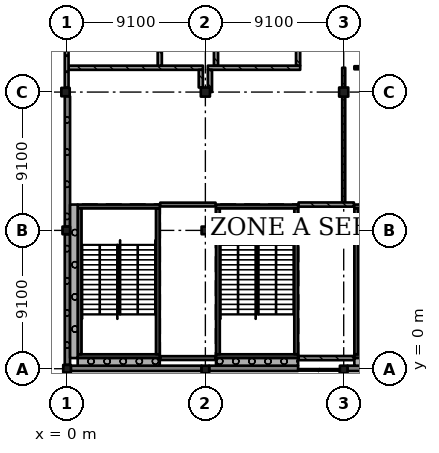
"""IFC4 building model, lengths in metres.
Left out: names, types, materials, properties, quantities, classifications, styles, units other than length and angle.
Written with IfcOpenShell. Run it as: python <this file> out.ifc"""

import sys

from ifc_helpers import new_model, si_unit, direction, frame, frame_2d, origin, origin_2d, place, context, subcontext, project, spatial, rectangle, extrude, element, fill, save


model = new_model("IFC4")
c1 = context("Model", 3, precision=1e-05, world=origin(), true_north=direction((0.0, 1.0)))
c2 = subcontext(c1, "Body", "Model", "MODEL_VIEW")
j1 = project(units=[si_unit("LENGTHUNIT", "METRE"), si_unit("PLANEANGLEUNIT", "RADIAN")], contexts=[c1])
p1 = place(None, origin())
s1 = spatial("IfcSite", under=j1, at=p1, CompositionType="ELEMENT")
p2 = place(p1, origin())
s2 = spatial("IfcBuilding", under=s1, at=p2, CompositionType="ELEMENT")
p3 = place(p2, frame((0.0, 0.0, 20.02)))
s3 = spatial("IfcBuildingStorey", under=s2, at=p3, CompositionType="ELEMENT", Elevation=20.02)
for number, where, z_axis, x_axis in (
    (1, (0.0, 0.0, 0.0), (0.0, 0.0, 1.0), (1.0, 0.0, 0.0)),
    (2, (-0.05, 9.1, 0.0), (0.0, 0.0, 1.0), (1.0, 0.0, 0.0)),
):
    element("IfcColumn", number, at=place(p3, frame(where, z_axis=z_axis, x_axis=x_axis)), inside=s3, PredefinedType="COLUMN", context=c2, shape_type="SweptSolid", body=[
        extrude(rectangle(XDim=0.5, YDim=0.5, at=origin_2d()), origin(), (0.0, 0.0, 1.0), 4.55),
    ])
p4 = place(p3, frame((-0.1, 18.2, 0.0), z_axis=(0.0, 0.0, 1.0), x_axis=(1.0, 0.0, 0.0)))
e3 = element("IfcColumn", 3, at=p4, inside=s3, PredefinedType="COLUMN", context=c2, shape_type="SweptSolid", body=[
    extrude(rectangle(XDim=0.55, YDim=0.55, at=origin_2d()), origin(), (0.0, 0.0, 1.0), 4.55),
])
for number, where, z_axis, x_axis in (
    (4, (9.1, -0.05, 0.0), (0.0, 0.0, 1.0), (1.0, 0.0, 0.0)),
    (5, (9.1, 9.1, 0.0), (0.0, 0.0, 1.0), (1.0, 0.0, 0.0)),
):
    element("IfcColumn", number, at=place(p3, frame(where, z_axis=z_axis, x_axis=x_axis)), inside=s3, PredefinedType="COLUMN", context=c2, shape_type="SweptSolid", body=[
        extrude(rectangle(XDim=0.5, YDim=0.5, at=origin_2d()), origin(), (0.0, 0.0, 1.0), 4.55),
    ])
p5 = place(p3, frame((9.1, 18.2, 0.0), z_axis=(0.0, 0.0, 1.0), x_axis=(1.0, 0.0, 0.0)))
e6 = element("IfcColumn", 6, at=p5, inside=s3, PredefinedType="COLUMN", context=c2, shape_type="SweptSolid", body=[
    extrude(rectangle(XDim=0.6, YDim=0.6, at=origin_2d()), origin(), (0.0, 0.0, 1.0), 4.55),
])
for number, where, z_axis, x_axis in (
    (7, (18.2, -0.05, 0.0), (0.0, 0.0, 1.0), (1.0, 0.0, 0.0)),
    (8, (18.2, 9.1, 0.0), (0.0, 0.0, 1.0), (1.0, 0.0, 0.0)),
):
    element("IfcColumn", number, at=place(p3, frame(where, z_axis=z_axis, x_axis=x_axis)), inside=s3, PredefinedType="COLUMN", context=c2, shape_type="SweptSolid", body=[
        extrude(rectangle(XDim=0.5, YDim=0.5, at=origin_2d()), origin(), (0.0, 0.0, 1.0), 4.55),
    ])
p6 = place(p3, frame((18.2, 18.2, 0.0), z_axis=(0.0, 0.0, 1.0), x_axis=(1.0, 0.0, 0.0)))
e9 = element("IfcColumn", 9, at=p6, inside=s3, PredefinedType="COLUMN", context=c2, shape_type="SweptSolid", body=[
    extrude(rectangle(XDim=0.6, YDim=0.6, at=origin_2d()), origin(), (0.0, 0.0, 1.0), 4.55),
])
p7 = place(p3, frame((6.1, 0.825, 0.0), z_axis=(0.0, 0.0, 1.0), x_axis=(-1.0, 0.0, 0.0)))
e10 = element("IfcWall", 10, at=p7, inside=s3, PredefinedType="SHEAR", context=c2, shape_type="SweptSolid", body=[
    extrude(rectangle(XDim=5.4, YDim=0.25, at=frame_2d((2.7, 0.0))), origin(), (0.0, 0.0, 1.0), 4.55),
])
p8 = place(p3, frame((6.1, 10.675, 0.0), z_axis=(0.0, 0.0, 1.0), x_axis=(-1.0, 0.0, 0.0)))
e11 = element("IfcWall", 11, at=p8, inside=s3, PredefinedType="SHEAR", context=c2, shape_type="SweptSolid", body=[
    extrude(rectangle(XDim=5.4, YDim=0.25, at=frame_2d((2.7, 0.0))), origin(), (0.0, 0.0, 1.0), 4.55),
])
p9 = place(p8, frame((1.5, 0.0, 0.0)))
e12 = element("IfcOpeningElement", 12, at=p9, cuts=e11, PredefinedType="OPENING", context=c2, shape_type="SweptSolid", body=[
    extrude(rectangle(XDim=2.4, YDim=2.1, at=frame_2d((1.2, 1.05))), frame((0.0, 0.135, 0.0), z_axis=(0.0, -1.0, 0.0), x_axis=(1.0, 0.0, 0.0)), (0.0, 0.0, 1.0), 0.27),
])
for number, where, z_axis, x_axis in (
    (13, (0.825, 10.55, 0.0), (0.0, 0.0, 1.0), (0.0, -1.0, 0.0)),
    (14, (5.975, 10.55, 0.0), (0.0, 0.0, 1.0), (0.0, -1.0, 0.0)),
):
    element("IfcWall", number, at=place(p3, frame(where, z_axis=z_axis, x_axis=x_axis)), inside=s3, PredefinedType="SHEAR", context=c2, shape_type="SweptSolid", body=[
        extrude(rectangle(XDim=9.6, YDim=0.25, at=frame_2d((4.8, 0.0))), origin(), (0.0, 0.0, 1.0), 4.55),
    ])
p10 = place(p3, frame((15.2, 0.825, 0.0), z_axis=(0.0, 0.0, 1.0), x_axis=(-1.0, 0.0, 0.0)))
e15 = element("IfcWall", 15, at=p10, inside=s3, PredefinedType="SHEAR", context=c2, shape_type="SweptSolid", body=[
    extrude(rectangle(XDim=5.4, YDim=0.25, at=frame_2d((2.7, 0.0))), origin(), (0.0, 0.0, 1.0), 4.55),
])
p11 = place(p3, frame((15.2, 10.675, 0.0), z_axis=(0.0, 0.0, 1.0), x_axis=(-1.0, 0.0, 0.0)))
e16 = element("IfcWall", 16, at=p11, inside=s3, PredefinedType="SHEAR", context=c2, shape_type="SweptSolid", body=[
    extrude(rectangle(XDim=5.4, YDim=0.25, at=frame_2d((2.7, 0.0))), origin(), (0.0, 0.0, 1.0), 4.55),
])
p12 = place(p11, frame((1.5, 0.0, 0.0)))
e17 = element("IfcOpeningElement", 17, at=p12, cuts=e16, PredefinedType="OPENING", context=c2, shape_type="SweptSolid", body=[
    extrude(rectangle(XDim=2.4, YDim=2.1, at=frame_2d((1.2, 1.05))), frame((0.0, 0.135, 0.0), z_axis=(0.0, -1.0, 0.0), x_axis=(1.0, 0.0, 0.0)), (0.0, 0.0, 1.0), 0.27),
])
for number, where, z_axis, x_axis in (
    (18, (9.925, 10.55, 0.0), (0.0, 0.0, 1.0), (0.0, -1.0, 0.0)),
    (19, (15.075, 10.55, 0.0), (0.0, 0.0, 1.0), (0.0, -1.0, 0.0)),
):
    element("IfcWall", number, at=place(p3, frame(where, z_axis=z_axis, x_axis=x_axis)), inside=s3, PredefinedType="SHEAR", context=c2, shape_type="SweptSolid", body=[
        extrude(rectangle(XDim=9.6, YDim=0.25, at=frame_2d((4.8, 0.0))), origin(), (0.0, 0.0, 1.0), 4.55),
    ])
p13 = place(p3, frame((24.3, 0.825, 0.0), z_axis=(0.0, 0.0, 1.0), x_axis=(-1.0, 0.0, 0.0)))
e20 = element("IfcWall", 20, at=p13, inside=s3, PredefinedType="SHEAR", context=c2, shape_type="SweptSolid", body=[
    extrude(rectangle(XDim=5.4, YDim=0.25, at=frame_2d((2.7, 0.0))), origin(), (0.0, 0.0, 1.0), 4.55),
])
p14 = place(p3, frame((24.3, 10.675, 0.0), z_axis=(0.0, 0.0, 1.0), x_axis=(-1.0, 0.0, 0.0)))
e21 = element("IfcWall", 21, at=p14, inside=s3, PredefinedType="SHEAR", context=c2, shape_type="SweptSolid", body=[
    extrude(rectangle(XDim=5.4, YDim=0.25, at=frame_2d((2.7, 0.0))), origin(), (0.0, 0.0, 1.0), 4.55),
])
p15 = place(p14, frame((1.5, 0.0, 0.0)))
e22 = element("IfcOpeningElement", 22, at=p15, cuts=e21, PredefinedType="OPENING", context=c2, shape_type="SweptSolid", body=[
    extrude(rectangle(XDim=2.4, YDim=2.1, at=frame_2d((1.2, 1.05))), frame((0.0, 0.135, 0.0), z_axis=(0.0, -1.0, 0.0), x_axis=(1.0, 0.0, 0.0)), (0.0, 0.0, 1.0), 0.27),
])
p16 = place(p3, frame((19.025, 10.55, 0.0), z_axis=(0.0, 0.0, 1.0), x_axis=(0.0, -1.0, 0.0)))
e23 = element("IfcWall", 23, at=p16, inside=s3, PredefinedType="SHEAR", context=c2, shape_type="SweptSolid", body=[
    extrude(rectangle(XDim=9.6, YDim=0.25, at=frame_2d((4.8, 0.0))), origin(), (0.0, 0.0, 1.0), 4.55),
])
p17 = place(p3, frame((0.25, 0.025, 0.0), z_axis=(0.0, 0.0, 1.0), x_axis=(1.0, 0.0, 0.0)))
e24 = element("IfcWall", 24, at=p17, inside=s3, PredefinedType="SOLIDWALL", context=c2, shape_type="SweptSolid", body=[
    extrude(rectangle(XDim=8.6, YDim=0.35, at=frame_2d((4.3, 0.0))), origin(), (0.0, 0.0, 1.0), 3.5),
])
p18 = place(p3, frame((9.35, 0.025, 0.0), z_axis=(0.0, 0.0, 1.0), x_axis=(1.0, 0.0, 0.0)))
e25 = element("IfcWall", 25, at=p18, inside=s3, PredefinedType="SOLIDWALL", context=c2, shape_type="SweptSolid", body=[
    extrude(rectangle(XDim=5.85, YDim=0.35, at=frame_2d((2.925, 0.0))), origin(), (0.0, 0.0, 1.0), 3.5),
])
p19 = place(p3, frame((18.45, 0.025, 0.0), z_axis=(0.0, 0.0, 1.0), x_axis=(1.0, 0.0, 0.0)))
e26 = element("IfcWall", 26, at=p19, inside=s3, PredefinedType="SOLIDWALL", context=c2, shape_type="SweptSolid", body=[
    extrude(rectangle(XDim=8.6, YDim=0.35, at=frame_2d((4.3, 0.0))), origin(), (0.0, 0.0, 1.0), 3.5),
])
p20 = place(p3, frame((-0.025, 27.025, 0.0), z_axis=(0.0, 0.0, 1.0), x_axis=(0.0, -1.0, 0.0)))
e27 = element("IfcWall", 27, at=p20, inside=s3, PredefinedType="SOLIDWALL", context=c2, shape_type="SweptSolid", body=[
    extrude(rectangle(XDim=8.55, YDim=0.25, at=frame_2d((4.275, 0.0))), origin(), (0.0, 0.0, 1.0), 3.5),
])
p21 = place(p3, frame((0.025, 17.925, 0.0), z_axis=(0.0, 0.0, 1.0), x_axis=(0.0, -1.0, 0.0)))
e28 = element("IfcWall", 28, at=p21, inside=s3, PredefinedType="SOLIDWALL", context=c2, shape_type="SweptSolid", body=[
    extrude(rectangle(XDim=8.575, YDim=0.35, at=frame_2d((4.288, 0.0))), origin(), (0.0, 0.0, 1.0), 3.5),
])
p22 = place(p3, frame((0.025, 8.85, 0.0), z_axis=(0.0, 0.0, 1.0), x_axis=(0.0, -1.0, 0.0)))
e29 = element("IfcWall", 29, at=p22, inside=s3, PredefinedType="SOLIDWALL", context=c2, shape_type="SweptSolid", body=[
    extrude(rectangle(XDim=8.6, YDim=0.35, at=frame_2d((4.3, 0.0))), origin(), (0.0, 0.0, 1.0), 3.5),
])
p23 = place(p3, frame((0.7, 0.45, 0.0), z_axis=(0.0, 0.0, 1.0), x_axis=(1.0, 0.0, 0.0)))
e30 = element("IfcWall", 30, at=p23, inside=s3, PredefinedType="SOLIDWALL", context=c2, shape_type="SweptSolid", body=[
    extrude(rectangle(XDim=5.4, YDim=0.5, at=frame_2d((2.7, 0.0))), origin(), (0.0, 0.0, 1.0), 4.25),
])
p24 = place(p3, frame((0.45, 0.7, 0.0), z_axis=(0.0, 0.0, 1.0), x_axis=(0.0, 1.0, 0.0)))
e31 = element("IfcWall", 31, at=p24, inside=s3, PredefinedType="SOLIDWALL", context=c2, shape_type="SweptSolid", body=[
    extrude(rectangle(XDim=10.1, YDim=0.5, at=frame_2d((5.05, 0.0))), origin(), (0.0, 0.0, 1.0), 4.25),
])
p25 = place(p3, frame((9.8, 0.45, 0.0), z_axis=(0.0, 0.0, 1.0), x_axis=(1.0, 0.0, 0.0)))
e32 = element("IfcWall", 32, at=p25, inside=s3, PredefinedType="SOLIDWALL", context=c2, shape_type="SweptSolid", body=[
    extrude(rectangle(XDim=5.4, YDim=0.5, at=frame_2d((2.7, 0.0))), origin(), (0.0, 0.0, 1.0), 4.25),
])
p26 = place(p3, frame((18.9, 0.45, 0.0), z_axis=(0.0, 0.0, 1.0), x_axis=(1.0, 0.0, 0.0)))
e33 = element("IfcWall", 33, at=p26, inside=s3, PredefinedType="SOLIDWALL", context=c2, shape_type="SweptSolid", body=[
    extrude(rectangle(XDim=5.4, YDim=0.5, at=frame_2d((2.7, 0.0))), origin(), (0.0, 0.0, 1.0), 4.25),
])
p27 = place(p3, frame((0.1, 19.8, 0.0), z_axis=(0.0, 0.0, 1.0), x_axis=(1.0, 0.0, 0.0)))
e34 = element("IfcWall", 34, at=p27, inside=s3, PredefinedType="SOLIDWALL", context=c2, shape_type="SweptSolid", body=[
    extrude(rectangle(XDim=8.837, YDim=0.275, at=frame_2d((4.419, 0.0))), origin(), (0.0, 0.0, 1.0), 4.25),
])
p28 = place(p27, frame((6.85, 0.0, 0.0)))
e35 = element("IfcOpeningElement", 35, at=p28, cuts=e34, PredefinedType="OPENING", context=c2, shape_type="SweptSolid", body=[
    extrude(rectangle(XDim=1.2, YDim=2.4, at=frame_2d((0.6, 1.2))), frame((0.0, 0.147, 0.0), z_axis=(0.0, -1.0, 0.0), x_axis=(1.0, 0.0, 0.0)), (0.0, 0.0, 1.0), 0.295),
])
p29 = place(p27, frame((2.65, 0.0, 0.0)))
e36 = element("IfcOpeningElement", 36, at=p29, cuts=e34, PredefinedType="OPENING", context=c2, shape_type="SweptSolid", body=[
    extrude(rectangle(XDim=1.2, YDim=2.4, at=frame_2d((0.6, 1.2))), frame((0.0, 0.147, 0.0), z_axis=(0.0, -1.0, 0.0), x_axis=(1.0, 0.0, 0.0)), (0.0, 0.0, 1.0), 0.295),
])
p30 = place(p3, frame((6.1, 29.762, 0.0), z_axis=(0.0, 0.0, 1.0), x_axis=(0.0, -1.0, 0.0)))
e37 = element("IfcWall", 37, at=p30, inside=s3, PredefinedType="SOLIDWALL", context=c2, shape_type="SweptSolid", body=[
    extrude(rectangle(XDim=9.825, YDim=0.275, at=frame_2d((4.913, 0.0))), origin(), (0.0, 0.0, 1.0), 4.25),
])
p31 = place(p3, frame((8.8, 19.663, 0.0), z_axis=(0.0, 0.0, 1.0), x_axis=(0.0, -1.0, 0.0)))
e38 = element("IfcWall", 38, at=p31, inside=s3, PredefinedType="SOLIDWALL", context=c2, shape_type="SweptSolid", body=[
    extrude(rectangle(XDim=1.163, YDim=0.275, at=frame_2d((0.581, 0.0))), origin(), (0.0, 0.0, 1.0), 4.25),
])
p32 = place(p3, frame((9.262, 19.8, 0.0), z_axis=(0.0, 0.0, 1.0), x_axis=(1.0, 0.0, 0.0)))
e39 = element("IfcWall", 39, at=p32, inside=s3, PredefinedType="SOLIDWALL", context=c2, shape_type="SweptSolid", body=[
    extrude(rectangle(XDim=6.075, YDim=0.275, at=frame_2d((3.038, 0.0))), origin(), (0.0, 0.0, 1.0), 4.25),
])
p33 = place(p32, frame((2.688, 0.0, 0.0)))
e40 = element("IfcOpeningElement", 40, at=p33, cuts=e39, PredefinedType="OPENING", context=c2, shape_type="SweptSolid", body=[
    extrude(rectangle(XDim=1.2, YDim=2.4, at=frame_2d((0.6, 1.2))), frame((0.0, 0.147, 0.0), z_axis=(0.0, -1.0, 0.0), x_axis=(1.0, 0.0, 0.0)), (0.0, 0.0, 1.0), 0.295),
])
p34 = place(p3, frame((9.35, 8.85, 0.0), z_axis=(0.0, 0.0, 1.0), x_axis=(1.0, 0.0, 0.0)))
e41 = element("IfcWall", 41, at=p34, inside=s3, PredefinedType="SOLIDWALL", context=c2, shape_type="SweptSolid", body=[
    extrude(rectangle(XDim=0.42, YDim=0.25, at=frame_2d((0.21, 0.0))), origin(), (0.0, 0.0, 1.0), 4.25),
])
p35 = place(p3, frame((9.4, 18.2, 0.0), z_axis=(0.0, 0.0, 1.0), x_axis=(0.0, 1.0, 0.0)))
e42 = element("IfcWall", 42, at=p35, inside=s3, PredefinedType="SOLIDWALL", context=c2, shape_type="SweptSolid", body=[
    extrude(rectangle(XDim=1.463, YDim=0.275, at=frame_2d((0.731, 0.0))), origin(), (0.0, 0.0, 1.0), 4.25),
])
p36 = place(p3, frame((9.77, 0.7, 0.0), z_axis=(0.0, 0.0, 1.0), x_axis=(-1.0, 0.0, 0.0)))
e43 = element("IfcWall", 43, at=p36, inside=s3, PredefinedType="SOLIDWALL", context=c2, shape_type="SweptSolid", body=[
    extrude(rectangle(XDim=3.64, YDim=0.25, at=frame_2d((1.82, 0.0))), origin(), (0.0, 0.0, 1.0), 4.25),
])
p37 = place(p3, frame((9.77, 9.35, 0.0), z_axis=(0.0, 0.0, 1.0), x_axis=(-1.0, 0.0, 0.0)))
e44 = element("IfcWall", 44, at=p37, inside=s3, PredefinedType="SOLIDWALL", context=c2, shape_type="SweptSolid", body=[
    extrude(rectangle(XDim=0.42, YDim=0.25, at=frame_2d((0.21, 0.0))), origin(), (0.0, 0.0, 1.0), 4.25),
])
p38 = place(p3, frame((9.77, 10.8, 0.0), z_axis=(0.0, 0.0, 1.0), x_axis=(-1.0, 0.0, 0.0)))
e45 = element("IfcWall", 45, at=p38, inside=s3, PredefinedType="SOLIDWALL", context=c2, shape_type="SweptSolid", body=[
    extrude(rectangle(XDim=3.64, YDim=0.25, at=frame_2d((1.82, 0.0))), origin(), (0.0, 0.0, 1.0), 4.25),
])
p39 = place(p38, frame((1.35, 0.0, 0.0)))
e46 = element("IfcOpeningElement", 46, at=p39, cuts=e45, PredefinedType="OPENING", context=c2, shape_type="SweptSolid", body=[
    extrude(rectangle(XDim=1.0, YDim=2.1, at=frame_2d((0.5, 1.05))), frame((0.0, 0.135, 0.0), z_axis=(0.0, -1.0, 0.0), x_axis=(1.0, 0.0, 0.0)), (0.0, 0.0, 1.0), 0.27),
])
p40 = place(p3, frame((9.8, 19.938, 0.0), z_axis=(0.0, 0.0, 1.0), x_axis=(0.0, 1.0, 0.0)))
e47 = element("IfcWall", 47, at=p40, inside=s3, PredefinedType="SOLIDWALL", context=c2, shape_type="SweptSolid", body=[
    extrude(rectangle(XDim=6.925, YDim=0.275, at=frame_2d((3.462, 0.0))), origin(), (0.0, 0.0, 1.0), 4.25),
])
p41 = place(p3, frame((15.2, 29.762, 0.0), z_axis=(0.0, 0.0, 1.0), x_axis=(0.0, -1.0, 0.0)))
e48 = element("IfcWall", 48, at=p41, inside=s3, PredefinedType="SOLIDWALL", context=c2, shape_type="SweptSolid", body=[
    extrude(rectangle(XDim=9.825, YDim=0.275, at=frame_2d((4.913, 0.0))), origin(), (0.0, 0.0, 1.0), 4.25),
])
p42 = place(p3, frame((15.23, 10.8, 0.0), z_axis=(0.0, 0.0, 1.0), x_axis=(1.0, 0.0, 0.0)))
e49 = element("IfcWall", 49, at=p42, inside=s3, PredefinedType="SOLIDWALL", context=c2, shape_type="SweptSolid", body=[
    extrude(rectangle(XDim=3.64, YDim=0.275, at=frame_2d((1.82, 0.0))), origin(), (0.0, 0.0, 1.0), 4.25),
])
p43 = place(p42, frame((0.92, 0.0, 0.0)))
e50 = element("IfcOpeningElement", 50, at=p43, cuts=e49, PredefinedType="OPENING", context=c2, shape_type="SweptSolid", body=[
    extrude(rectangle(XDim=1.2, YDim=2.4, at=frame_2d((0.6, 1.2))), frame((0.0, 0.147, 0.0), z_axis=(0.0, -1.0, 0.0), x_axis=(1.0, 0.0, 0.0)), (0.0, 0.0, 1.0), 0.295),
])
p44 = place(p3, frame((18.2, 17.9, 0.0), z_axis=(0.0, 0.0, 1.0), x_axis=(0.0, -1.0, 0.0)))
e51 = element("IfcWall", 51, at=p44, inside=s3, PredefinedType="PARTITIONING", context=c2, shape_type="SweptSolid", body=[
    extrude(rectangle(XDim=6.962, YDim=0.2, at=frame_2d((3.481, 0.0))), origin(), (0.0, 0.0, 1.0), 3.5),
])
p45 = place(p44, frame((0.85, 0.0, 0.0)))
e52 = element("IfcOpeningElement", 52, at=p45, cuts=e51, PredefinedType="OPENING", context=c2, shape_type="SweptSolid", body=[
    extrude(rectangle(XDim=1.8, YDim=2.4, at=frame_2d((0.9, 1.2))), frame((0.0, 0.11, 0.0), z_axis=(0.0, -1.0, 0.0), x_axis=(1.0, 0.0, 0.0)), (0.0, 0.0, 1.0), 0.22),
])
p46 = place(p44, frame((4.35, 0.0, 0.0)))
e53 = element("IfcOpeningElement", 53, at=p46, cuts=e51, PredefinedType="OPENING", context=c2, shape_type="SweptSolid", body=[
    extrude(rectangle(XDim=1.8, YDim=2.4, at=frame_2d((0.9, 1.2))), frame((0.0, 0.11, 0.0), z_axis=(0.0, -1.0, 0.0), x_axis=(1.0, 0.0, 0.0)), (0.0, 0.0, 1.0), 0.22),
])
p47 = place(p3, frame((18.2, 19.8, 0.0), z_axis=(0.0, 0.0, 1.0), x_axis=(0.0, -1.0, 0.0)))
e54 = element("IfcWall", 54, at=p47, inside=s3, PredefinedType="PARTITIONING", context=c2, shape_type="SweptSolid", body=[
    extrude(rectangle(XDim=1.3, YDim=0.2, at=frame_2d((0.65, 0.0))), origin(), (0.0, 0.0, 1.0), 3.5),
])
p48 = place(p3, frame((18.45, 8.85, 0.0), z_axis=(0.0, 0.0, 1.0), x_axis=(1.0, 0.0, 0.0)))
e55 = element("IfcWall", 55, at=p48, inside=s3, PredefinedType="SOLIDWALL", context=c2, shape_type="SweptSolid", body=[
    extrude(rectangle(XDim=0.42, YDim=0.275, at=frame_2d((0.21, 0.0))), origin(), (0.0, 0.0, 1.0), 4.25),
])
p49 = place(p3, frame((18.87, 0.7, 0.0), z_axis=(0.0, 0.0, 1.0), x_axis=(-1.0, 0.0, 0.0)))
e56 = element("IfcWall", 56, at=p49, inside=s3, PredefinedType="SOLIDWALL", context=c2, shape_type="SweptSolid", body=[
    extrude(rectangle(XDim=3.64, YDim=0.275, at=frame_2d((1.82, 0.0))), origin(), (0.0, 0.0, 1.0), 4.25),
])
p50 = place(p3, frame((18.87, 9.35, 0.0), z_axis=(0.0, 0.0, 1.0), x_axis=(-1.0, 0.0, 0.0)))
e57 = element("IfcWall", 57, at=p50, inside=s3, PredefinedType="SOLIDWALL", context=c2, shape_type="SweptSolid", body=[
    extrude(rectangle(XDim=0.42, YDim=0.275, at=frame_2d((0.21, 0.0))), origin(), (0.0, 0.0, 1.0), 4.25),
])
p51 = place(p3, frame((18.9, 19.8, 0.0), z_axis=(0.0, 0.0, 1.0), x_axis=(1.0, 0.0, 0.0)))
e58 = element("IfcWall", 58, at=p51, inside=s3, PredefinedType="PARTITIONING", context=c2, shape_type="SweptSolid", body=[
    extrude(rectangle(XDim=5.4, YDim=0.2, at=frame_2d((2.7, 0.0))), origin(), (0.0, 0.0, 1.0), 4.25),
])
p52 = place(p51, frame((1.85, 0.0, 0.0)))
e59 = element("IfcOpeningElement", 59, at=p52, cuts=e58, PredefinedType="OPENING", context=c2, shape_type="SweptSolid", body=[
    extrude(rectangle(XDim=1.8, YDim=2.4, at=frame_2d((0.9, 1.2))), frame((0.0, 0.11, 0.0), z_axis=(0.0, -1.0, 0.0), x_axis=(1.0, 0.0, 0.0)), (0.0, 0.0, 1.0), 0.22),
])
p53 = place(p28, origin())
e60 = element("IfcDoor", 60, at=p53, inside=s3, OperationType="SINGLE_SWING_LEFT", PredefinedType="DOOR", context=c2, shape_type="SweptSolid", body=[
    extrude(rectangle(XDim=1.2, YDim=2.4, at=frame_2d((0.6, 1.2))), frame((0.0, 0.025, 0.0), z_axis=(0.0, -1.0, 0.0), x_axis=(1.0, 0.0, 0.0)), (0.0, 0.0, 1.0), 0.05),
])
fill(e35, e60)
p54 = place(p29, origin())
e61 = element("IfcDoor", 61, at=p54, inside=s3, OperationType="SINGLE_SWING_RIGHT", PredefinedType="DOOR", context=c2, shape_type="SweptSolid", body=[
    extrude(rectangle(XDim=1.2, YDim=2.4, at=frame_2d((0.6, 1.2))), frame((0.0, 0.025, 0.0), z_axis=(0.0, -1.0, 0.0), x_axis=(1.0, 0.0, 0.0)), (0.0, 0.0, 1.0), 0.05),
])
fill(e36, e61)
p55 = place(p33, origin())
e62 = element("IfcDoor", 62, at=p55, inside=s3, OperationType="SINGLE_SWING_RIGHT", PredefinedType="DOOR", context=c2, shape_type="SweptSolid", body=[
    extrude(rectangle(XDim=1.2, YDim=2.4, at=frame_2d((0.6, 1.2))), frame((0.0, 0.025, 0.0), z_axis=(0.0, -1.0, 0.0), x_axis=(1.0, 0.0, 0.0)), (0.0, 0.0, 1.0), 0.05),
])
fill(e40, e62)
p56 = place(p39, origin())
e63 = element("IfcDoor", 63, at=p56, inside=s3, OperationType="SINGLE_SWING_LEFT", PredefinedType="DOOR", context=c2, shape_type="SweptSolid", body=[
    extrude(rectangle(XDim=1.0, YDim=2.1, at=frame_2d((0.5, 1.05))), frame((0.0, 0.025, 0.0), z_axis=(0.0, -1.0, 0.0), x_axis=(1.0, 0.0, 0.0)), (0.0, 0.0, 1.0), 0.05),
])
fill(e46, e63)
p57 = place(p43, origin())
e64 = element("IfcDoor", 64, at=p57, inside=s3, OperationType="SINGLE_SWING_RIGHT", PredefinedType="DOOR", context=c2, shape_type="SweptSolid", body=[
    extrude(rectangle(XDim=1.2, YDim=2.4, at=frame_2d((0.6, 1.2))), frame((0.0, 0.025, 0.0), z_axis=(0.0, -1.0, 0.0), x_axis=(1.0, 0.0, 0.0)), (0.0, 0.0, 1.0), 0.05),
])
fill(e50, e64)
p58 = place(p45, origin())
e65 = element("IfcDoor", 65, at=p58, inside=s3, OperationType="DOUBLE_DOOR_SINGLE_SWING", PredefinedType="DOOR", context=c2, shape_type="SweptSolid", body=[
    extrude(rectangle(XDim=1.8, YDim=2.4, at=frame_2d((0.9, 1.2))), frame((0.0, 0.025, 0.0), z_axis=(0.0, -1.0, 0.0), x_axis=(1.0, 0.0, 0.0)), (0.0, 0.0, 1.0), 0.05),
])
fill(e52, e65)
p59 = place(p46, origin())
e66 = element("IfcDoor", 66, at=p59, inside=s3, OperationType="DOUBLE_DOOR_SINGLE_SWING", PredefinedType="DOOR", context=c2, shape_type="SweptSolid", body=[
    extrude(rectangle(XDim=1.8, YDim=2.4, at=frame_2d((0.9, 1.2))), frame((0.0, 0.025, 0.0), z_axis=(0.0, -1.0, 0.0), x_axis=(1.0, 0.0, 0.0)), (0.0, 0.0, 1.0), 0.05),
])
fill(e53, e66)
p60 = place(p9, origin())
e67 = element("IfcDoor", 67, at=p60, inside=s3, OperationType="DOUBLE_DOOR_SINGLE_SWING", PredefinedType="DOOR", context=c2, shape_type="SweptSolid", body=[
    extrude(rectangle(XDim=2.4, YDim=2.1, at=frame_2d((1.2, 1.05))), frame((0.0, 0.025, 0.0), z_axis=(0.0, -1.0, 0.0), x_axis=(1.0, 0.0, 0.0)), (0.0, 0.0, 1.0), 0.05),
])
fill(e12, e67)
p61 = place(p12, origin())
e68 = element("IfcDoor", 68, at=p61, inside=s3, OperationType="DOUBLE_DOOR_SINGLE_SWING", PredefinedType="DOOR", context=c2, shape_type="SweptSolid", body=[
    extrude(rectangle(XDim=2.4, YDim=2.1, at=frame_2d((1.2, 1.05))), frame((0.0, 0.025, 0.0), z_axis=(0.0, -1.0, 0.0), x_axis=(1.0, 0.0, 0.0)), (0.0, 0.0, 1.0), 0.05),
])
fill(e17, e68)
save(model, sys.argv[1])
